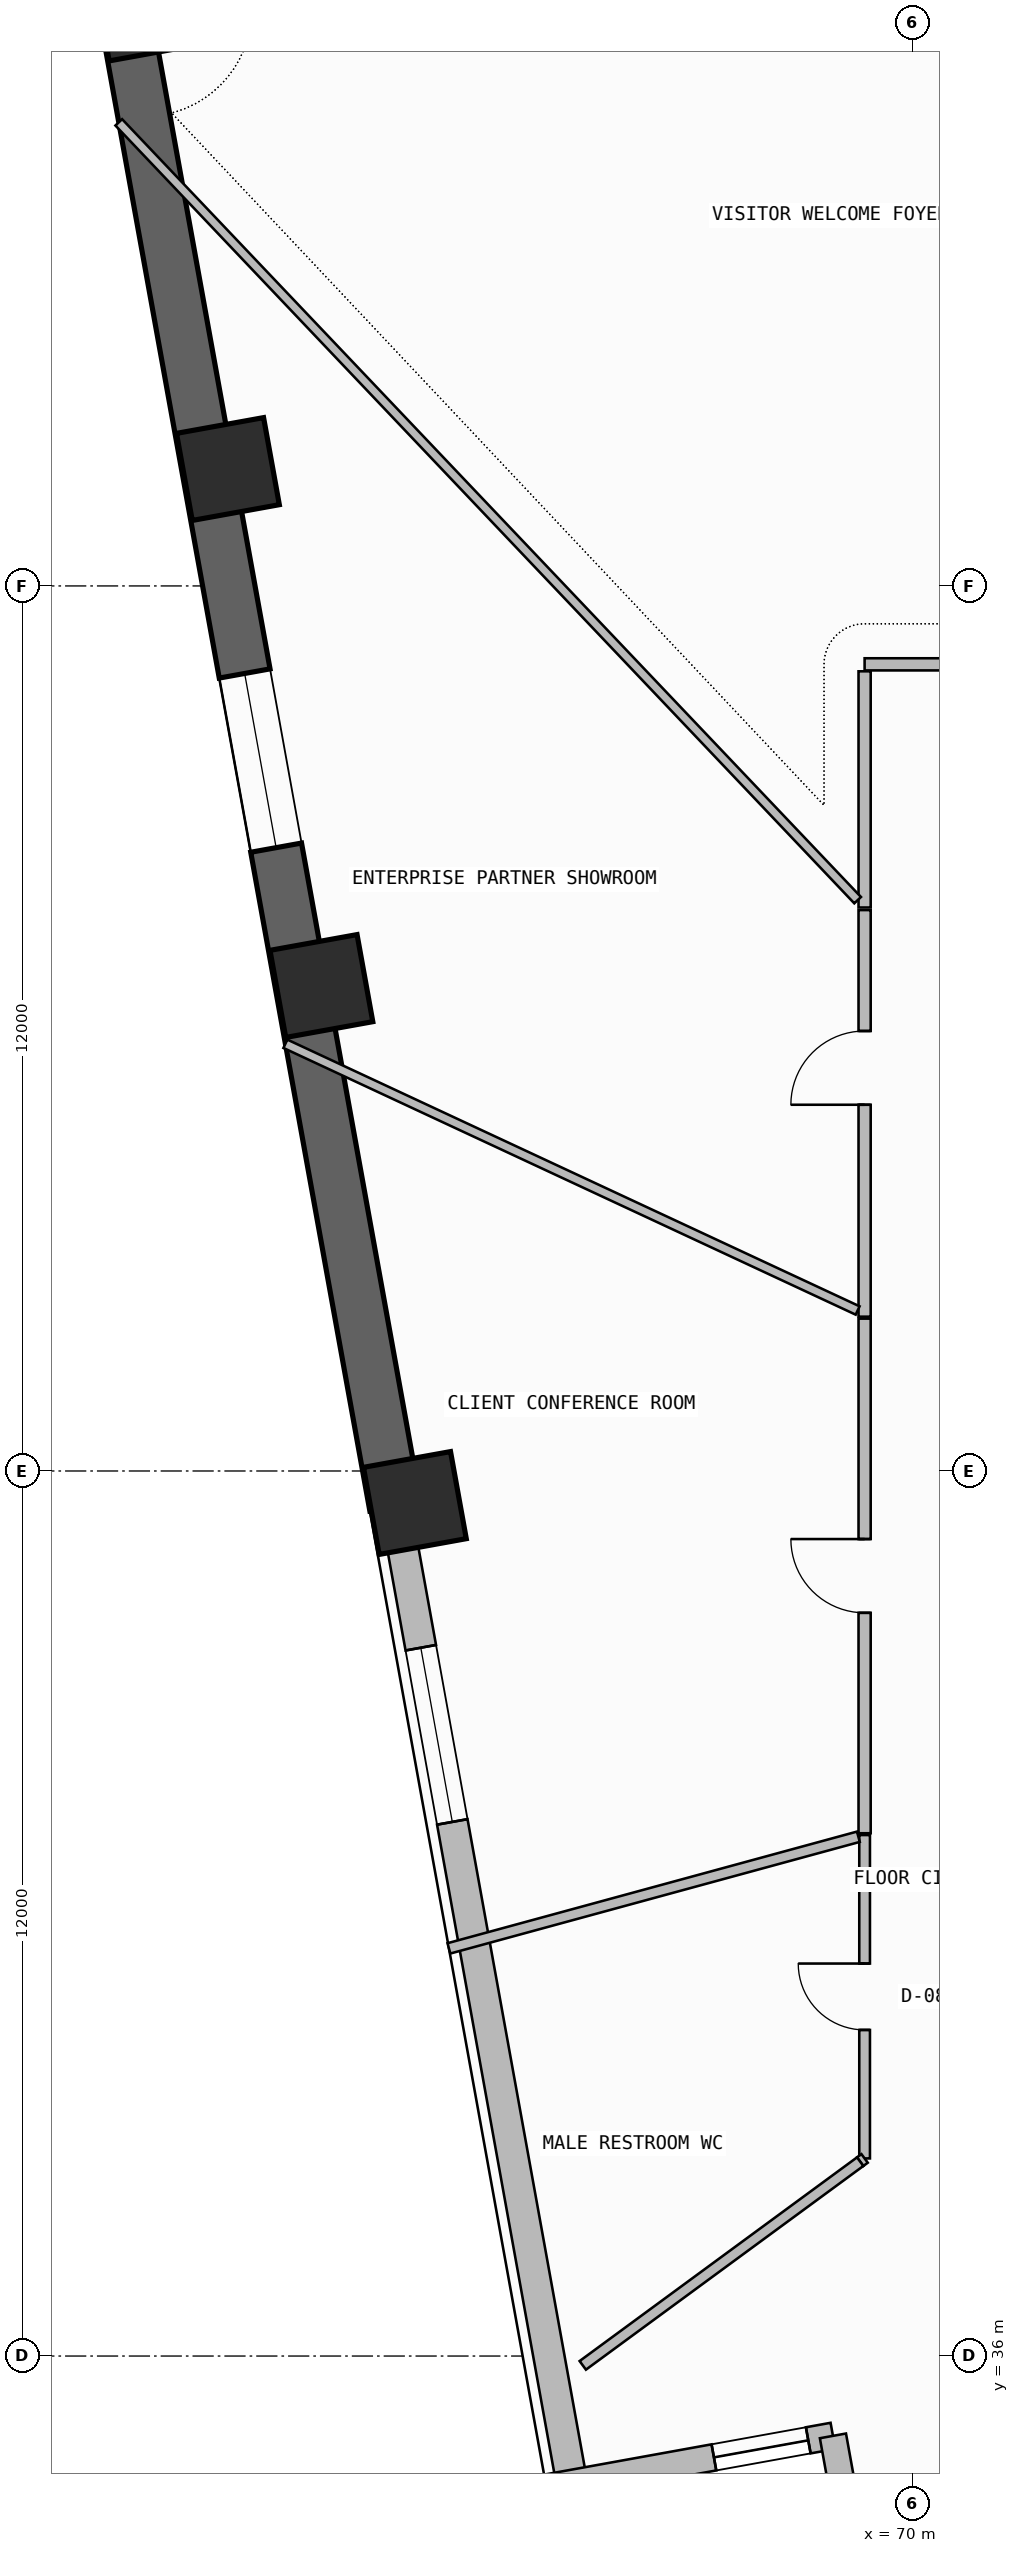
"""IFC4 building model, lengths in metres.
Left out: names, types, materials, properties, quantities, classifications, styles, units other than length and angle.
Written with IfcOpenShell. Run it as: python <this file> out.ifc"""

import sys

from ifc_helpers import new_model, si_unit, direction, frame, frame_2d, origin, origin_2d, place, context, subcontext, project, spatial, rectangle, extrude, element, fill, save


model = new_model("IFC4")
c1 = context("Model", 3, precision=1e-05, world=origin(), true_north=direction((0.0, 1.0)))
c2 = subcontext(c1, "Body", "Model", "MODEL_VIEW")
j1 = project(units=[si_unit("LENGTHUNIT", "METRE"), si_unit("PLANEANGLEUNIT", "RADIAN")], contexts=[c1])
p1 = place(None, origin())
s1 = spatial("IfcSite", under=j1, at=p1, CompositionType="ELEMENT")
p2 = place(p1, origin())
s2 = spatial("IfcBuilding", under=s1, at=p2, CompositionType="ELEMENT")
p3 = place(p2, frame((0.0, 0.0, 106.5)))
s3 = spatial("IfcBuildingStorey", under=s2, at=p3, CompositionType="ELEMENT", Elevation=106.5)
for number, where, z_axis, x_axis in (
    (1, (59.594, 67.816, 0.0), (0.0, 0.0, 1.0), (-0.178, 0.984, 0.0)),
    (2, (60.72, 61.585, 0.0), (0.0, 0.0, 1.0), (-0.178, 0.984, 0.0)),
    (3, (61.988, 54.575, 0.0), (0.0, 0.0, 1.0), (-0.178, 0.984, 0.0)),
    (4, (63.255, 47.566, 0.0), (0.0, 0.0, 1.0), (-0.178, 0.984, 0.0)),
):
    element("IfcColumn", number, at=place(p3, frame(where, z_axis=z_axis, x_axis=x_axis)), inside=s3, PredefinedType="COLUMN", context=c2, shape_type="SweptSolid", body=[
        extrude(rectangle(XDim=1.2, YDim=1.2, at=origin_2d()), origin(), (0.0, 0.0, 1.0), 3.6),
    ])
p4 = place(p3, frame((59.328, 67.768, -0.26), z_axis=(0.0, 0.0, 1.0), x_axis=(0.177933213615, -0.984042565895, 0.0)))
e5 = element("IfcWall", 5, at=p4, inside=s3, PredefinedType="SHEAR", context=c2, shape_type="SweptSolid", body=[
    extrude(rectangle(XDim=20.579, YDim=0.7, at=frame_2d((10.289, 0.0))), origin(), (0.0, 0.0, 1.0), 3.6),
])
p5 = place(p4, frame((9.1, 0.0, 1.2)))
e6 = element("IfcOpeningElement", 6, at=p5, cuts=e5, PredefinedType="OPENING", context=c2, shape_type="SweptSolid", body=[
    extrude(rectangle(XDim=2.4, YDim=0.9, at=frame_2d((1.2, 0.45))), frame((0.0, 0.36, 0.0), z_axis=(0.0, -1.0, 0.0), x_axis=(1.0, 0.0, 0.0)), (0.0, 0.0, 1.0), 0.72),
])
p6 = place(p3, frame((62.99, 47.518, 0.0), z_axis=(0.0, 0.0, 1.0), x_axis=(0.177948058674, -0.984039881516, 0.0)))
e7 = element("IfcWall", 7, at=p6, inside=s3, PredefinedType="SOLIDWALL", context=c2, shape_type="SweptSolid", body=[
    extrude(rectangle(XDim=13.455, YDim=0.42, at=frame_2d((6.728, 0.0))), origin(), (0.0, 0.0, 1.0), 2.725),
])
p7 = place(p6, frame((1.945, 0.0, 1.2)))
e8 = element("IfcOpeningElement", 8, at=p7, cuts=e7, PredefinedType="OPENING", context=c2, shape_type="SweptSolid", body=[
    extrude(rectangle(XDim=2.4, YDim=0.9, at=frame_2d((1.2, 0.45))), frame((0.0, 0.22, 0.0), z_axis=(0.0, -1.0, 0.0), x_axis=(1.0, 0.0, 0.0)), (0.0, 0.0, 1.0), 0.44),
])
p8 = place(p3, frame((65.039, 34.215, 0.0), z_axis=(0.0, 0.0, 1.0), x_axis=(0.984046535247, 0.177911260096, 0.0)))
e9 = element("IfcWall", 9, at=p8, inside=s3, PredefinedType="SOLIDWALL", context=c2, shape_type="SweptSolid", body=[
    extrude(rectangle(XDim=3.948, YDim=0.36, at=frame_2d((1.974, 0.0))), origin(), (0.0, 0.0, 1.0), 3.34),
])
p9 = place(p8, frame((2.308, 0.0, 0.45)))
e10 = element("IfcOpeningElement", 10, at=p9, cuts=e9, PredefinedType="OPENING", context=c2, shape_type="SweptSolid", body=[
    extrude(rectangle(XDim=1.3, YDim=2.4, at=frame_2d((0.65, 1.2))), frame((0.0, 0.19, 0.0), z_axis=(0.0, -1.0, 0.0), x_axis=(1.0, 0.0, 0.0)), (0.0, 0.0, 1.0), 0.38),
])
p10 = place(p3, frame((68.924, 34.917, 0.0), z_axis=(0.0, 0.0, 1.0), x_axis=(0.177981971326, -0.984033748346, 0.0)))
e11 = element("IfcWall", 11, at=p10, inside=s3, PredefinedType="SOLIDWALL", context=c2, shape_type="SweptSolid", body=[
    extrude(rectangle(XDim=3.948, YDim=0.36, at=frame_2d((1.974, 0.0))), origin(), (0.0, 0.0, 1.0), 3.34),
])
p11 = place(p3, frame((88.921, 61.823, 0.0), z_axis=(0.0, 0.0, 1.0), x_axis=(-0.897993533426, 0.440008652103, 0.0)))
e12 = element("IfcWall", 12, at=p11, inside=s3, PredefinedType="PARAPET", context=c2, shape_type="SweptSolid", body=[
    extrude(rectangle(XDim=26.864, YDim=0.2, at=frame_2d((13.432, 0.0))), origin(), (0.0, 0.0, 1.0), 1.15),
])
p12 = place(p3, frame((69.354, 43.064, 0.0), z_axis=(0.0, 0.0, 1.0), x_axis=(0.0, -1.0, 0.0)))
e13 = element("IfcWall", 13, at=p12, inside=s3, PredefinedType="PARTITIONING", context=c2, shape_type="SweptSolid", body=[
    extrude(rectangle(XDim=4.384, YDim=0.145, at=frame_2d((2.192, 0.0))), origin(), (0.0, 0.0, 1.0), 3.34),
])
p13 = place(p12, frame((1.742, 0.0, 0.0)))
e14 = element("IfcOpeningElement", 14, at=p13, cuts=e13, PredefinedType="OPENING", context=c2, shape_type="SweptSolid", body=[
    extrude(rectangle(XDim=0.9, YDim=2.1, at=frame_2d((0.45, 1.05))), frame((0.0, 0.083, 0.0), z_axis=(0.0, -1.0, 0.0), x_axis=(1.0, 0.0, 0.0)), (0.0, 0.0, 1.0), 0.165),
])
p14 = place(p3, frame((69.354, 38.679, 0.0), z_axis=(0.0, 0.0, 1.0), x_axis=(-0.805467130134, -0.592640449407, 0.0)))
e15 = element("IfcWall", 15, at=p14, inside=s3, PredefinedType="PARTITIONING", context=c2, shape_type="SweptSolid", body=[
    extrude(rectangle(XDim=0.074, YDim=0.145, at=frame_2d((0.037, 0.0))), origin(), (0.0, 0.0, 1.0), 3.34),
])
p15 = place(p3, frame((63.717, 41.528, 0.0), z_axis=(0.0, 0.0, 1.0), x_axis=(0.964810798793, 0.262945094139, 0.0)))
e16 = element("IfcWall", 16, at=p15, inside=s3, PredefinedType="PARTITIONING", context=c2, shape_type="SweptSolid", body=[
    extrude(rectangle(XDim=5.755, YDim=0.145, at=frame_2d((2.877, 0.0))), origin(), (0.0, 0.0, 1.0), 3.34),
])
p16 = place(p3, frame((78.094, 58.937, 0.0), z_axis=(0.0, 0.0, 1.0), x_axis=(-1.0, 0.0, 0.0)))
e17 = element("IfcWall", 17, at=p16, inside=s3, PredefinedType="PARTITIONING", context=c2, shape_type="SweptSolid", body=[
    extrude(rectangle(XDim=8.74, YDim=0.165, at=frame_2d((4.37, 0.0))), origin(), (0.0, 0.0, 1.0), 2.725),
])
p17 = place(p16, frame((2.769, 0.0, 0.0)))
e18 = element("IfcOpeningElement", 18, at=p17, cuts=e17, PredefinedType="OPENING", context=c2, shape_type="SweptSolid", body=[
    extrude(rectangle(XDim=1.0, YDim=2.2, at=frame_2d((0.5, 1.1))), frame((0.0, 0.093, 0.0), z_axis=(0.0, -1.0, 0.0), x_axis=(1.0, 0.0, 0.0)), (0.0, 0.0, 1.0), 0.185),
])
p18 = place(p3, frame((69.354, 58.843, 0.0), z_axis=(0.0, 0.0, 1.0), x_axis=(0.0, -1.0, 0.0)))
e19 = element("IfcWall", 19, at=p18, inside=s3, PredefinedType="PARTITIONING", context=c2, shape_type="SweptSolid", body=[
    extrude(rectangle(XDim=3.203, YDim=0.165, at=frame_2d((1.601, 0.0))), origin(), (0.0, 0.0, 1.0), 2.725),
])
p19 = place(p3, frame((69.259, 55.74, 0.0), z_axis=(0.0, 0.0, 1.0), x_axis=(-0.688765781804, 0.72498392935, 0.0)))
e20 = element("IfcWall", 20, at=p19, inside=s3, PredefinedType="PARTITIONING", context=c2, shape_type="SweptSolid", body=[
    extrude(rectangle(XDim=14.547, YDim=0.125, at=frame_2d((7.273, 0.0))), origin(), (0.0, 0.0, 1.0), 2.725),
])
p20 = place(p3, frame((69.354, 55.605, 0.0), z_axis=(0.0, 0.0, 1.0), x_axis=(0.0, -1.0, 0.0)))
e21 = element("IfcWall", 21, at=p20, inside=s3, PredefinedType="PARTITIONING", context=c2, shape_type="SweptSolid", body=[
    extrude(rectangle(XDim=5.513, YDim=0.165, at=frame_2d((2.756, 0.0))), origin(), (0.0, 0.0, 1.0), 2.725),
])
p21 = place(p20, frame((1.639, 0.0, 0.0)))
e22 = element("IfcOpeningElement", 22, at=p21, cuts=e21, PredefinedType="OPENING", context=c2, shape_type="SweptSolid", body=[
    extrude(rectangle(XDim=1.0, YDim=2.2, at=frame_2d((0.5, 1.1))), frame((0.0, 0.093, 0.0), z_axis=(0.0, -1.0, 0.0), x_axis=(1.0, 0.0, 0.0)), (0.0, 0.0, 1.0), 0.185),
])
p22 = place(p3, frame((69.259, 50.176, 0.0), z_axis=(0.0, 0.0, 1.0), x_axis=(-0.90641249547, 0.422393641117, 0.0)))
e23 = element("IfcWall", 23, at=p22, inside=s3, PredefinedType="PARTITIONING", context=c2, shape_type="SweptSolid", body=[
    extrude(rectangle(XDim=8.561, YDim=0.125, at=frame_2d((4.281, 0.0))), origin(), (0.0, 0.0, 1.0), 2.725),
])
p23 = place(p3, frame((69.354, 50.066, 0.0), z_axis=(0.0, 0.0, 1.0), x_axis=(0.0, -1.0, 0.0)))
e24 = element("IfcWall", 24, at=p23, inside=s3, PredefinedType="PARTITIONING", context=c2, shape_type="SweptSolid", body=[
    extrude(rectangle(XDim=6.977, YDim=0.165, at=frame_2d((3.489, 0.0))), origin(), (0.0, 0.0, 1.0), 3.34),
])
p24 = place(p23, frame((2.989, 0.0, 0.0)))
e25 = element("IfcOpeningElement", 25, at=p24, cuts=e24, PredefinedType="OPENING", context=c2, shape_type="SweptSolid", body=[
    extrude(rectangle(XDim=1.0, YDim=2.2, at=frame_2d((0.5, 1.1))), frame((0.0, 0.093, 0.0), z_axis=(0.0, -1.0, 0.0), x_axis=(1.0, 0.0, 0.0)), (0.0, 0.0, 1.0), 0.185),
])
p25 = place(p3, frame((69.294, 38.635, 0.0), z_axis=(0.0, 0.0, 1.0), x_axis=(-0.806085538754, -0.591799040394, 0.0)))
e26 = element("IfcWall", 26, at=p25, inside=s3, PredefinedType="PARTITIONING", context=c2, shape_type="SweptSolid", body=[
    extrude(rectangle(XDim=4.667, YDim=0.145, at=frame_2d((2.333, 0.0))), origin(), (0.0, 0.0, 1.0), 3.34),
])
p26 = place(p5, origin())
e27 = element("IfcWindow", 27, at=p26, inside=s3, PartitioningType="SINGLE_PANEL", PredefinedType="WINDOW", context=c2, shape_type="SweptSolid", body=[
    extrude(rectangle(XDim=2.4, YDim=0.9, at=frame_2d((1.2, 0.45))), frame((0.0, 0.03, 0.0), z_axis=(0.0, -1.0, 0.0), x_axis=(1.0, 0.0, 0.0)), (0.0, 0.0, 1.0), 0.06),
])
fill(e6, e27)
p27 = place(p7, origin())
e28 = element("IfcWindow", 28, at=p27, inside=s3, PartitioningType="SINGLE_PANEL", PredefinedType="WINDOW", context=c2, shape_type="SweptSolid", body=[
    extrude(rectangle(XDim=2.4, YDim=0.9, at=frame_2d((1.2, 0.45))), frame((0.0, 0.03, 0.0), z_axis=(0.0, -1.0, 0.0), x_axis=(1.0, 0.0, 0.0)), (0.0, 0.0, 1.0), 0.06),
])
fill(e8, e28)
p28 = place(p9, origin())
e29 = element("IfcWindow", 29, at=p28, inside=s3, PartitioningType="SINGLE_PANEL", PredefinedType="WINDOW", context=c2, shape_type="SweptSolid", body=[
    extrude(rectangle(XDim=1.3, YDim=2.4, at=frame_2d((0.65, 1.2))), frame((0.0, 0.03, 0.0), z_axis=(0.0, -1.0, 0.0), x_axis=(1.0, 0.0, 0.0)), (0.0, 0.0, 1.0), 0.06),
])
fill(e10, e29)
p29 = place(p13, frame((0.9, 0.0, 0.0), z_axis=(0.0, 0.0, 1.0), x_axis=(-1.0, 0.0, 0.0)))
e30 = element("IfcDoor", 30, at=p29, inside=s3, OperationType="SINGLE_SWING_RIGHT", PredefinedType="DOOR", context=c2, shape_type="SweptSolid", body=[
    extrude(rectangle(XDim=0.9, YDim=2.1, at=frame_2d((0.45, 1.05))), frame((0.0, 0.025, 0.0), z_axis=(0.0, -1.0, 0.0), x_axis=(1.0, 0.0, 0.0)), (0.0, 0.0, 1.0), 0.05),
])
fill(e14, e30)
p30 = place(p21, frame((1.0, 0.0, 0.0), z_axis=(0.0, 0.0, 1.0), x_axis=(-1.0, 0.0, 0.0)))
e31 = element("IfcDoor", 31, at=p30, inside=s3, OperationType="SINGLE_SWING_LEFT", PredefinedType="DOOR", context=c2, shape_type="SweptSolid", body=[
    extrude(rectangle(XDim=1.0, YDim=2.2, at=frame_2d((0.5, 1.1))), frame((0.0, 0.025, 0.0), z_axis=(0.0, -1.0, 0.0), x_axis=(1.0, 0.0, 0.0)), (0.0, 0.0, 1.0), 0.05),
])
fill(e22, e31)
p31 = place(p24, frame((1.0, 0.0, 0.0), z_axis=(0.0, 0.0, 1.0), x_axis=(-1.0, 0.0, 0.0)))
e32 = element("IfcDoor", 32, at=p31, inside=s3, OperationType="SINGLE_SWING_RIGHT", PredefinedType="DOOR", context=c2, shape_type="SweptSolid", body=[
    extrude(rectangle(XDim=1.0, YDim=2.2, at=frame_2d((0.5, 1.1))), frame((0.0, 0.025, 0.0), z_axis=(0.0, -1.0, 0.0), x_axis=(1.0, 0.0, 0.0)), (0.0, 0.0, 1.0), 0.05),
])
fill(e25, e32)
save(model, sys.argv[1])
